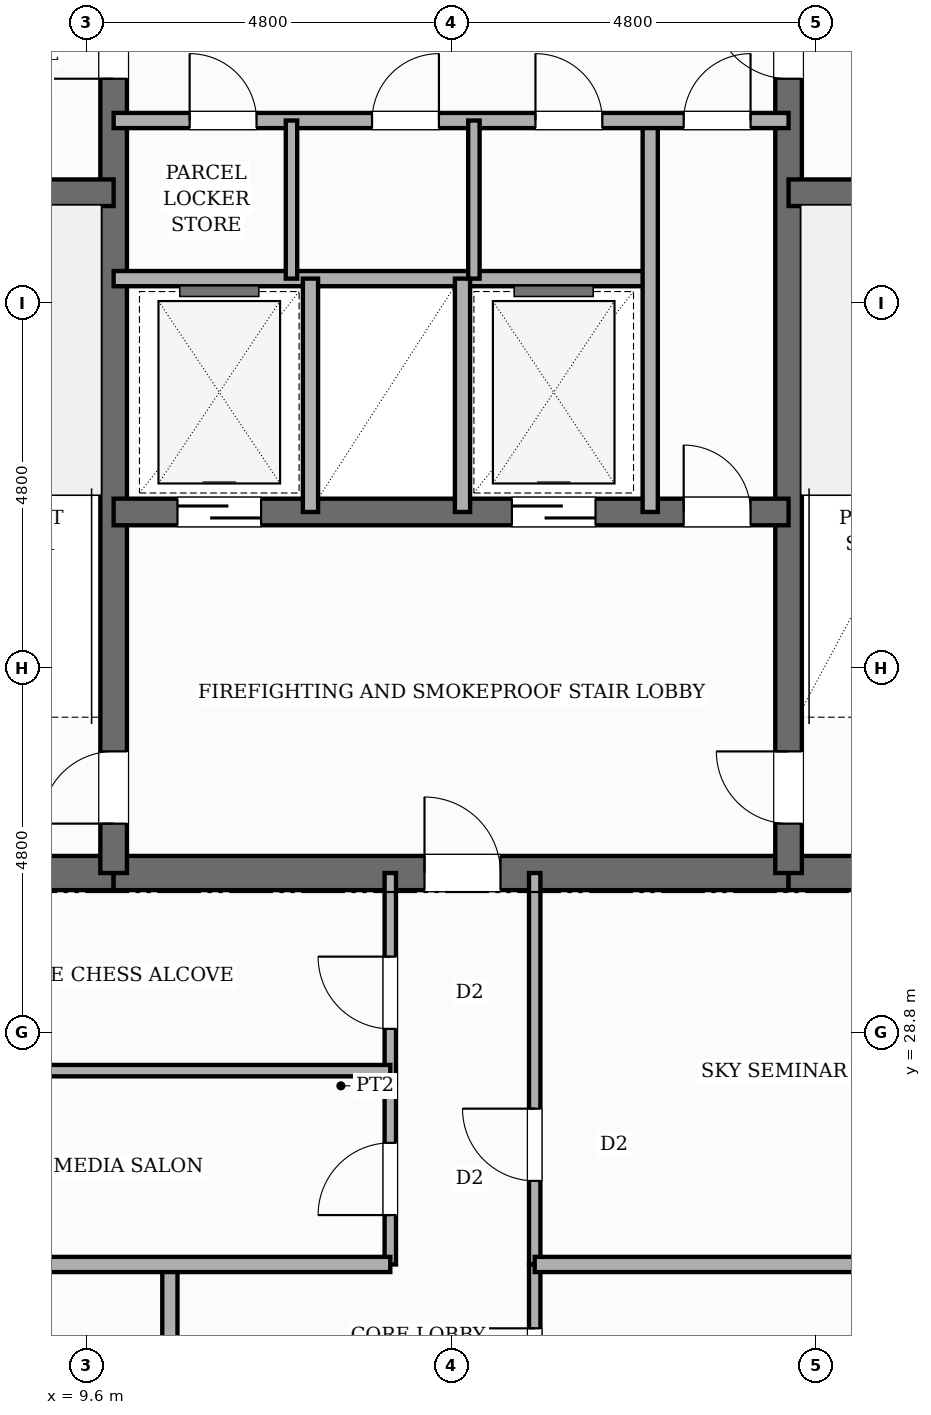
"""IFC4 building model, lengths in metres.
Left out: names, types, materials, properties, quantities, classifications, styles, units other than length and angle.
Written with IfcOpenShell. Run it as: python <this file> out.ifc"""

import sys

from ifc_helpers import new_model, si_unit, direction, frame, frame_2d, origin, place, context, subcontext, project, spatial, rectangle, extrude, element, fill, save


model = new_model("IFC4")
c1 = context("Model", 3, precision=1e-05, world=origin(), true_north=direction((0.0, 1.0)))
c2 = subcontext(c1, "Body", "Model", "MODEL_VIEW")
j1 = project(units=[si_unit("LENGTHUNIT", "METRE"), si_unit("PLANEANGLEUNIT", "RADIAN")], contexts=[c1])
p1 = place(None, origin())
s1 = spatial("IfcSite", under=j1, at=p1, CompositionType="ELEMENT")
p2 = place(p1, origin())
s2 = spatial("IfcBuilding", under=s1, at=p2, CompositionType="ELEMENT")
p3 = place(p2, frame((0.0, 0.0, 239.8)))
s3 = spatial("IfcBuildingStorey", under=s2, at=p3, CompositionType="ELEMENT", Elevation=239.8)
p4 = place(p3, frame((6.05, 30.9, 0.0), z_axis=(0.0, 0.0, 1.0), x_axis=(1.0, 0.0, 0.0)))
e1 = element("IfcWall", 1, at=p4, inside=s3, PredefinedType="SHEAR", context=c2, shape_type="SweptSolid", body=[
    extrude(rectangle(XDim=3.91, YDim=0.45, at=frame_2d((1.955, 0.0))), origin(), (0.0, 0.0, 1.0), 4.3),
])
p5 = place(p3, frame((9.96, 30.9, 0.0), z_axis=(0.0, 0.0, 1.0), x_axis=(1.0, 0.0, 0.0)))
e2 = element("IfcWall", 2, at=p5, inside=s3, PredefinedType="SHEAR", context=c2, shape_type="SweptSolid", body=[
    extrude(rectangle(XDim=8.88, YDim=0.45, at=frame_2d((4.44, 0.0))), origin(), (0.0, 0.0, 1.0), 4.3),
])
p6 = place(p5, frame((4.09, 0.0, 0.0)))
e3 = element("IfcOpeningElement", 3, at=p6, cuts=e2, PredefinedType="OPENING", context=c2, shape_type="SweptSolid", body=[
    extrude(rectangle(XDim=1.0, YDim=2.15, at=frame_2d((0.5, 1.075))), frame((0.0, 0.235, 0.0), z_axis=(0.0, -1.0, 0.0), x_axis=(1.0, 0.0, 0.0)), (0.0, 0.0, 1.0), 0.47),
])
p7 = place(p3, frame((18.84, 30.9, 0.0), z_axis=(0.0, 0.0, 1.0), x_axis=(1.0, 0.0, 0.0)))
e4 = element("IfcWall", 4, at=p7, inside=s3, PredefinedType="SHEAR", context=c2, shape_type="SweptSolid", body=[
    extrude(rectangle(XDim=3.91, YDim=0.45, at=frame_2d((1.955, 0.0))), origin(), (0.0, 0.0, 1.0), 4.3),
])
p8 = place(p3, frame((9.96, 30.9, 0.0), z_axis=(0.0, 0.0, 1.0), x_axis=(0.0, 1.0, 0.0)))
e5 = element("IfcWall", 5, at=p8, inside=s3, PredefinedType="SHEAR", context=c2, shape_type="SweptSolid", body=[
    extrude(rectangle(XDim=14.9, YDim=0.35, at=frame_2d((7.45, 0.0))), origin(), (0.0, 0.0, 1.0), 4.3),
])
p9 = place(p8, frame((0.65, 0.0, 0.0)))
e6 = element("IfcOpeningElement", 6, at=p9, cuts=e5, PredefinedType="OPENING", context=c2, shape_type="SweptSolid", body=[
    extrude(rectangle(XDim=0.95, YDim=2.1, at=frame_2d((0.475, 1.05))), frame((0.0, 0.185, 0.0), z_axis=(0.0, -1.0, 0.0), x_axis=(1.0, 0.0, 0.0)), (0.0, 0.0, 1.0), 0.37),
])
p10 = place(p8, frame((10.45, 0.0, 0.0)))
e7 = element("IfcOpeningElement", 7, at=p10, cuts=e5, PredefinedType="OPENING", context=c2, shape_type="SweptSolid", body=[
    extrude(rectangle(XDim=1.0, YDim=2.15, at=frame_2d((0.5, 1.075))), frame((0.0, 0.185, 0.0), z_axis=(0.0, -1.0, 0.0), x_axis=(1.0, 0.0, 0.0)), (0.0, 0.0, 1.0), 0.37),
])
p11 = place(p3, frame((18.84, 30.9, 0.0), z_axis=(0.0, 0.0, 1.0), x_axis=(0.0, 1.0, 0.0)))
e8 = element("IfcWall", 8, at=p11, inside=s3, PredefinedType="SHEAR", context=c2, shape_type="SweptSolid", body=[
    extrude(rectangle(XDim=14.9, YDim=0.35, at=frame_2d((7.45, 0.0))), origin(), (0.0, 0.0, 1.0), 4.3),
])
p12 = place(p11, frame((0.65, 0.0, 0.0)))
e9 = element("IfcOpeningElement", 9, at=p12, cuts=e8, PredefinedType="OPENING", context=c2, shape_type="SweptSolid", body=[
    extrude(rectangle(XDim=0.95, YDim=2.1, at=frame_2d((0.475, 1.05))), frame((0.0, 0.185, 0.0), z_axis=(0.0, -1.0, 0.0), x_axis=(1.0, 0.0, 0.0)), (0.0, 0.0, 1.0), 0.37),
])
p13 = place(p11, frame((10.45, 0.0, 0.0)))
e10 = element("IfcOpeningElement", 10, at=p13, cuts=e8, PredefinedType="OPENING", context=c2, shape_type="SweptSolid", body=[
    extrude(rectangle(XDim=1.0, YDim=2.15, at=frame_2d((0.5, 1.075))), frame((0.0, 0.185, 0.0), z_axis=(0.0, -1.0, 0.0), x_axis=(1.0, 0.0, 0.0)), (0.0, 0.0, 1.0), 0.37),
])
for number, where, z_axis, x_axis in (
    (11, (6.05, 39.85, 0.0), (0.0, 0.0, 1.0), (1.0, 0.0, 0.0)),
    (12, (18.84, 39.85, 0.0), (0.0, 0.0, 1.0), (1.0, 0.0, 0.0)),
):
    element("IfcWall", number, at=place(p3, frame(where, z_axis=z_axis, x_axis=x_axis)), inside=s3, PredefinedType="SHEAR", context=c2, shape_type="SweptSolid", body=[
        extrude(rectangle(XDim=3.91, YDim=0.35, at=frame_2d((1.955, 0.0))), origin(), (0.0, 0.0, 1.0), 4.3),
    ])
p14 = place(p3, frame((9.96, 35.65, 0.0), z_axis=(0.0, 0.0, 1.0), x_axis=(1.0, 0.0, 0.0)))
e13 = element("IfcWall", 13, at=p14, inside=s3, PredefinedType="SHEAR", context=c2, shape_type="SweptSolid", body=[
    extrude(rectangle(XDim=8.88, YDim=0.35, at=frame_2d((4.44, 0.0))), origin(), (0.0, 0.0, 1.0), 4.3),
])
p15 = place(p14, frame((0.84, 0.0, 0.0)))
e14 = element("IfcOpeningElement", 14, at=p15, cuts=e13, PredefinedType="OPENING", context=c2, shape_type="SweptSolid", body=[
    extrude(rectangle(XDim=1.1, YDim=2.15, at=frame_2d((0.55, 1.075))), frame((0.0, 0.185, 0.0), z_axis=(0.0, -1.0, 0.0), x_axis=(1.0, 0.0, 0.0)), (0.0, 0.0, 1.0), 0.37),
])
p16 = place(p14, frame((5.24, 0.0, 0.0)))
e15 = element("IfcOpeningElement", 15, at=p16, cuts=e13, PredefinedType="OPENING", context=c2, shape_type="SweptSolid", body=[
    extrude(rectangle(XDim=1.1, YDim=2.15, at=frame_2d((0.55, 1.075))), frame((0.0, 0.185, 0.0), z_axis=(0.0, -1.0, 0.0), x_axis=(1.0, 0.0, 0.0)), (0.0, 0.0, 1.0), 0.37),
])
p17 = place(p14, frame((7.5, 0.0, 0.0)))
e16 = element("IfcOpeningElement", 16, at=p17, cuts=e13, PredefinedType="OPENING", context=c2, shape_type="SweptSolid", body=[
    extrude(rectangle(XDim=0.88, YDim=2.1, at=frame_2d((0.44, 1.05))), frame((0.0, 0.185, 0.0), z_axis=(0.0, -1.0, 0.0), x_axis=(1.0, 0.0, 0.0)), (0.0, 0.0, 1.0), 0.37),
])
p18 = place(p3, frame((9.96, 38.72, 0.0), z_axis=(0.0, 0.0, 1.0), x_axis=(1.0, 0.0, 0.0)))
e17 = element("IfcWall", 17, at=p18, inside=s3, PredefinedType="POLYGONAL", context=c2, shape_type="SweptSolid", body=[
    extrude(rectangle(XDim=7.06, YDim=0.2, at=frame_2d((3.53, 0.0))), origin(), (0.0, 0.0, 1.0), 4.04),
])
for number, where, z_axis, x_axis in (
    (18, (12.55, 35.65, 0.0), (0.0, 0.0, 1.0), (0.0, 1.0, 0.0)),
    (19, (14.55, 35.65, 0.0), (0.0, 0.0, 1.0), (0.0, 1.0, 0.0)),
):
    element("IfcWall", number, at=place(p3, frame(where, z_axis=z_axis, x_axis=x_axis)), inside=s3, PredefinedType="POLYGONAL", context=c2, shape_type="SweptSolid", body=[
        extrude(rectangle(XDim=3.07, YDim=0.2, at=frame_2d((1.535, 0.0))), origin(), (0.0, 0.0, 1.0), 4.04),
    ])
p19 = place(p3, frame((17.02, 35.65, 0.0), z_axis=(0.0, 0.0, 1.0), x_axis=(0.0, 1.0, 0.0)))
e20 = element("IfcWall", 20, at=p19, inside=s3, PredefinedType="POLYGONAL", context=c2, shape_type="SweptSolid", body=[
    extrude(rectangle(XDim=5.15, YDim=0.2, at=frame_2d((2.575, 0.0))), origin(), (0.0, 0.0, 1.0), 4.04),
])
p20 = place(p3, frame((9.96, 40.8, 0.0), z_axis=(0.0, 0.0, 1.0), x_axis=(1.0, 0.0, 0.0)))
e21 = element("IfcWall", 21, at=p20, inside=s3, PredefinedType="POLYGONAL", context=c2, shape_type="SweptSolid", body=[
    extrude(rectangle(XDim=8.88, YDim=0.2, at=frame_2d((4.44, 0.0))), origin(), (0.0, 0.0, 1.0), 4.04),
])
p21 = place(p20, frame((7.5, 0.0, 0.0)))
e22 = element("IfcOpeningElement", 22, at=p21, cuts=e21, PredefinedType="OPENING", context=c2, shape_type="SweptSolid", body=[
    extrude(rectangle(XDim=0.88, YDim=2.1, at=frame_2d((0.44, 1.05))), frame((0.0, 0.11, 0.0), z_axis=(0.0, -1.0, 0.0), x_axis=(1.0, 0.0, 0.0)), (0.0, 0.0, 1.0), 0.22),
])
p22 = place(p20, frame((1.0, 0.0, 0.0)))
e23 = element("IfcOpeningElement", 23, at=p22, cuts=e21, PredefinedType="OPENING", context=c2, shape_type="SweptSolid", body=[
    extrude(rectangle(XDim=0.88, YDim=2.1, at=frame_2d((0.44, 1.05))), frame((0.0, 0.11, 0.0), z_axis=(0.0, -1.0, 0.0), x_axis=(1.0, 0.0, 0.0)), (0.0, 0.0, 1.0), 0.22),
])
p23 = place(p20, frame((3.4, 0.0, 0.0)))
e24 = element("IfcOpeningElement", 24, at=p23, cuts=e21, PredefinedType="OPENING", context=c2, shape_type="SweptSolid", body=[
    extrude(rectangle(XDim=0.88, YDim=2.1, at=frame_2d((0.44, 1.05))), frame((0.0, 0.11, 0.0), z_axis=(0.0, -1.0, 0.0), x_axis=(1.0, 0.0, 0.0)), (0.0, 0.0, 1.0), 0.22),
])
p24 = place(p20, frame((5.55, 0.0, 0.0)))
e25 = element("IfcOpeningElement", 25, at=p24, cuts=e21, PredefinedType="OPENING", context=c2, shape_type="SweptSolid", body=[
    extrude(rectangle(XDim=0.88, YDim=2.1, at=frame_2d((0.44, 1.05))), frame((0.0, 0.11, 0.0), z_axis=(0.0, -1.0, 0.0), x_axis=(1.0, 0.0, 0.0)), (0.0, 0.0, 1.0), 0.22),
])
for number, where, z_axis, x_axis in (
    (26, (12.3, 38.72, 0.0), (0.0, 0.0, 1.0), (0.0, 1.0, 0.0)),
    (27, (14.7, 38.72, 0.0), (0.0, 0.0, 1.0), (0.0, 1.0, 0.0)),
):
    element("IfcWall", number, at=place(p3, frame(where, z_axis=z_axis, x_axis=x_axis)), inside=s3, PredefinedType="PARTITIONING", context=c2, shape_type="SweptSolid", body=[
        extrude(rectangle(XDim=2.08, YDim=0.15, at=frame_2d((1.04, 0.0))), origin(), (0.0, 0.0, 1.0), 4.04),
    ])
p25 = place(p3, frame((13.6, 25.75, 0.0), z_axis=(0.0, 0.0, 1.0), x_axis=(0.0, 1.0, 0.0)))
e28 = element("IfcWall", 28, at=p25, inside=s3, PredefinedType="PARTITIONING", context=c2, shape_type="SweptSolid", body=[
    extrude(rectangle(XDim=5.15, YDim=0.15, at=frame_2d((2.575, 0.0))), origin(), (0.0, 0.0, 1.0), 4.04),
])
p26 = place(p25, frame((0.65, 0.0, 0.0)))
e29 = element("IfcOpeningElement", 29, at=p26, cuts=e28, PredefinedType="OPENING", context=c2, shape_type="SweptSolid", body=[
    extrude(rectangle(XDim=0.95, YDim=2.15, at=frame_2d((0.475, 1.075))), frame((0.0, 0.085, 0.0), z_axis=(0.0, -1.0, 0.0), x_axis=(1.0, 0.0, 0.0)), (0.0, 0.0, 1.0), 0.17),
])
p27 = place(p25, frame((3.1, 0.0, 0.0)))
e30 = element("IfcOpeningElement", 30, at=p27, cuts=e28, PredefinedType="OPENING", context=c2, shape_type="SweptSolid", body=[
    extrude(rectangle(XDim=0.95, YDim=2.15, at=frame_2d((0.475, 1.075))), frame((0.0, 0.085, 0.0), z_axis=(0.0, -1.0, 0.0), x_axis=(1.0, 0.0, 0.0)), (0.0, 0.0, 1.0), 0.17),
])
p28 = place(p3, frame((15.5, 25.75, 0.0), z_axis=(0.0, 0.0, 1.0), x_axis=(0.0, 1.0, 0.0)))
e31 = element("IfcWall", 31, at=p28, inside=s3, PredefinedType="PARTITIONING", context=c2, shape_type="SweptSolid", body=[
    extrude(rectangle(XDim=5.15, YDim=0.15, at=frame_2d((2.575, 0.0))), origin(), (0.0, 0.0, 1.0), 4.04),
])
p29 = place(p28, frame((1.1, 0.0, 0.0)))
e32 = element("IfcOpeningElement", 32, at=p29, cuts=e31, PredefinedType="OPENING", context=c2, shape_type="SweptSolid", body=[
    extrude(rectangle(XDim=0.95, YDim=2.15, at=frame_2d((0.475, 1.075))), frame((0.0, 0.085, 0.0), z_axis=(0.0, -1.0, 0.0), x_axis=(1.0, 0.0, 0.0)), (0.0, 0.0, 1.0), 0.17),
])
p30 = place(p3, frame((6.05, 28.3, 0.0), z_axis=(0.0, 0.0, 1.0), x_axis=(1.0, 0.0, 0.0)))
e33 = element("IfcWall", 33, at=p30, inside=s3, PredefinedType="PARTITIONING", context=c2, shape_type="SweptSolid", body=[
    extrude(rectangle(XDim=7.55, YDim=0.15, at=frame_2d((3.775, 0.0))), origin(), (0.0, 0.0, 1.0), 4.04),
])
p31 = place(p3, frame((10.7, 9.88, 0.0), z_axis=(0.0, 0.0, 1.0), x_axis=(0.0, 1.0, 0.0)))
e34 = element("IfcWall", 34, at=p31, inside=s3, PredefinedType="PARTITIONING", context=c2, shape_type="SweptSolid", body=[
    extrude(rectangle(XDim=15.87, YDim=0.2, at=frame_2d((7.935, 0.0))), origin(), (0.0, 0.0, 1.0), 4.04),
])
p32 = place(p31, frame((1.35, 0.0, 0.0)))
e35 = element("IfcOpeningElement", 35, at=p32, cuts=e34, PredefinedType="OPENING", context=c2, shape_type="SweptSolid", body=[
    extrude(rectangle(XDim=0.98, YDim=2.18, at=frame_2d((0.49, 1.09))), frame((0.0, 0.11, 0.0), z_axis=(0.0, -1.0, 0.0), x_axis=(1.0, 0.0, 0.0)), (0.0, 0.0, 1.0), 0.22),
])
p33 = place(p31, frame((5.23, 0.0, 0.0)))
e36 = element("IfcOpeningElement", 36, at=p33, cuts=e34, PredefinedType="OPENING", context=c2, shape_type="SweptSolid", body=[
    extrude(rectangle(XDim=0.98, YDim=2.18, at=frame_2d((0.49, 1.09))), frame((0.0, 0.11, 0.0), z_axis=(0.0, -1.0, 0.0), x_axis=(1.0, 0.0, 0.0)), (0.0, 0.0, 1.0), 0.22),
])
p34 = place(p31, frame((9.23, 0.0, 0.0)))
e37 = element("IfcOpeningElement", 37, at=p34, cuts=e34, PredefinedType="OPENING", context=c2, shape_type="SweptSolid", body=[
    extrude(rectangle(XDim=0.98, YDim=2.18, at=frame_2d((0.49, 1.09))), frame((0.0, 0.11, 0.0), z_axis=(0.0, -1.0, 0.0), x_axis=(1.0, 0.0, 0.0)), (0.0, 0.0, 1.0), 0.22),
])
p35 = place(p31, frame((13.27, 0.0, 0.0)))
e38 = element("IfcOpeningElement", 38, at=p35, cuts=e34, PredefinedType="OPENING", context=c2, shape_type="SweptSolid", body=[
    extrude(rectangle(XDim=0.98, YDim=2.18, at=frame_2d((0.49, 1.09))), frame((0.0, 0.11, 0.0), z_axis=(0.0, -1.0, 0.0), x_axis=(1.0, 0.0, 0.0)), (0.0, 0.0, 1.0), 0.22),
])
p36 = place(p3, frame((5.08, 25.75, 0.0), z_axis=(0.0, 0.0, 1.0), x_axis=(1.0, 0.0, 0.0)))
e39 = element("IfcWall", 39, at=p36, inside=s3, PredefinedType="PARTITIONING", context=c2, shape_type="SweptSolid", body=[
    extrude(rectangle(XDim=8.52, YDim=0.2, at=frame_2d((4.26, 0.0))), origin(), (0.0, 0.0, 1.0), 4.04),
])
p37 = place(p3, frame((15.5, 23.4, 0.0), z_axis=(0.0, 0.0, 1.0), x_axis=(0.0, 1.0, 0.0)))
e40 = element("IfcWall", 40, at=p37, inside=s3, PredefinedType="PARTITIONING", context=c2, shape_type="SweptSolid", body=[
    extrude(rectangle(XDim=2.35, YDim=0.15, at=frame_2d((1.175, 0.0))), origin(), (0.0, 0.0, 1.0), 4.04),
])
p38 = place(p37, frame((0.65, 0.0, 0.0)))
e41 = element("IfcOpeningElement", 41, at=p38, cuts=e40, PredefinedType="OPENING", context=c2, shape_type="SweptSolid", body=[
    extrude(rectangle(XDim=0.86, YDim=2.1, at=frame_2d((0.43, 1.05))), frame((0.0, 0.085, 0.0), z_axis=(0.0, -1.0, 0.0), x_axis=(1.0, 0.0, 0.0)), (0.0, 0.0, 1.0), 0.17),
])
p39 = place(p3, frame((15.5, 25.75, 0.0), z_axis=(0.0, 0.0, 1.0), x_axis=(1.0, 0.0, 0.0)))
e42 = element("IfcWall", 42, at=p39, inside=s3, PredefinedType="PARTITIONING", context=c2, shape_type="SweptSolid", body=[
    extrude(rectangle(XDim=8.22, YDim=0.2, at=frame_2d((4.11, 0.0))), origin(), (0.0, 0.0, 1.0), 4.04),
])
p40 = place(p9, origin())
e43 = element("IfcDoor", 43, at=p40, inside=s3, OperationType="SINGLE_SWING_LEFT", PredefinedType="DOOR", context=c2, shape_type="SweptSolid", body=[
    extrude(rectangle(XDim=0.95, YDim=2.1, at=frame_2d((0.475, 1.05))), frame((0.0, 0.025, 0.0), z_axis=(0.0, -1.0, 0.0), x_axis=(1.0, 0.0, 0.0)), (0.0, 0.0, 1.0), 0.05),
])
fill(e6, e43)
p41 = place(p12, origin())
e44 = element("IfcDoor", 44, at=p41, inside=s3, OperationType="SINGLE_SWING_RIGHT", PredefinedType="DOOR", context=c2, shape_type="SweptSolid", body=[
    extrude(rectangle(XDim=0.95, YDim=2.1, at=frame_2d((0.475, 1.05))), frame((0.0, 0.025, 0.0), z_axis=(0.0, -1.0, 0.0), x_axis=(1.0, 0.0, 0.0)), (0.0, 0.0, 1.0), 0.05),
])
fill(e9, e44)
p42 = place(p6, origin())
e45 = element("IfcDoor", 45, at=p42, inside=s3, OperationType="SINGLE_SWING_LEFT", PredefinedType="DOOR", context=c2, shape_type="SweptSolid", body=[
    extrude(rectangle(XDim=1.0, YDim=2.15, at=frame_2d((0.5, 1.075))), frame((0.0, 0.025, 0.0), z_axis=(0.0, -1.0, 0.0), x_axis=(1.0, 0.0, 0.0)), (0.0, 0.0, 1.0), 0.05),
])
fill(e3, e45)
p43 = place(p15, origin())
e46 = element("IfcDoor", 46, at=p43, inside=s3, OperationType="SLIDING_TO_LEFT", PredefinedType="DOOR", context=c2, shape_type="SweptSolid", body=[
    extrude(rectangle(XDim=1.1, YDim=2.15, at=frame_2d((0.55, 1.075))), frame((0.0, 0.025, 0.0), z_axis=(0.0, -1.0, 0.0), x_axis=(1.0, 0.0, 0.0)), (0.0, 0.0, 1.0), 0.05),
])
fill(e14, e46)
p44 = place(p16, origin())
e47 = element("IfcDoor", 47, at=p44, inside=s3, OperationType="SLIDING_TO_RIGHT", PredefinedType="DOOR", context=c2, shape_type="SweptSolid", body=[
    extrude(rectangle(XDim=1.1, YDim=2.15, at=frame_2d((0.55, 1.075))), frame((0.0, 0.025, 0.0), z_axis=(0.0, -1.0, 0.0), x_axis=(1.0, 0.0, 0.0)), (0.0, 0.0, 1.0), 0.05),
])
fill(e15, e47)
p45 = place(p17, origin())
e48 = element("IfcDoor", 48, at=p45, inside=s3, OperationType="SINGLE_SWING_LEFT", PredefinedType="DOOR", context=c2, shape_type="SweptSolid", body=[
    extrude(rectangle(XDim=0.88, YDim=2.1, at=frame_2d((0.44, 1.05))), frame((0.0, 0.025, 0.0), z_axis=(0.0, -1.0, 0.0), x_axis=(1.0, 0.0, 0.0)), (0.0, 0.0, 1.0), 0.05),
])
fill(e16, e48)
p46 = place(p21, origin())
e49 = element("IfcDoor", 49, at=p46, inside=s3, OperationType="SINGLE_SWING_RIGHT", PredefinedType="DOOR", context=c2, shape_type="SweptSolid", body=[
    extrude(rectangle(XDim=0.88, YDim=2.1, at=frame_2d((0.44, 1.05))), frame((0.0, 0.025, 0.0), z_axis=(0.0, -1.0, 0.0), x_axis=(1.0, 0.0, 0.0)), (0.0, 0.0, 1.0), 0.05),
])
fill(e22, e49)
p47 = place(p10, origin())
e50 = element("IfcDoor", 50, at=p47, inside=s3, OperationType="SINGLE_SWING_LEFT", PredefinedType="DOOR", context=c2, shape_type="SweptSolid", body=[
    extrude(rectangle(XDim=1.0, YDim=2.15, at=frame_2d((0.5, 1.075))), frame((0.0, 0.025, 0.0), z_axis=(0.0, -1.0, 0.0), x_axis=(1.0, 0.0, 0.0)), (0.0, 0.0, 1.0), 0.05),
])
fill(e7, e50)
p48 = place(p13, origin())
e51 = element("IfcDoor", 51, at=p48, inside=s3, OperationType="SINGLE_SWING_RIGHT", PredefinedType="DOOR", context=c2, shape_type="SweptSolid", body=[
    extrude(rectangle(XDim=1.0, YDim=2.15, at=frame_2d((0.5, 1.075))), frame((0.0, 0.025, 0.0), z_axis=(0.0, -1.0, 0.0), x_axis=(1.0, 0.0, 0.0)), (0.0, 0.0, 1.0), 0.05),
])
fill(e10, e51)
p49 = place(p22, origin())
e52 = element("IfcDoor", 52, at=p49, inside=s3, OperationType="SINGLE_SWING_LEFT", PredefinedType="DOOR", context=c2, shape_type="SweptSolid", body=[
    extrude(rectangle(XDim=0.88, YDim=2.1, at=frame_2d((0.44, 1.05))), frame((0.0, 0.025, 0.0), z_axis=(0.0, -1.0, 0.0), x_axis=(1.0, 0.0, 0.0)), (0.0, 0.0, 1.0), 0.05),
])
fill(e23, e52)
p50 = place(p23, origin())
e53 = element("IfcDoor", 53, at=p50, inside=s3, OperationType="SINGLE_SWING_RIGHT", PredefinedType="DOOR", context=c2, shape_type="SweptSolid", body=[
    extrude(rectangle(XDim=0.88, YDim=2.1, at=frame_2d((0.44, 1.05))), frame((0.0, 0.025, 0.0), z_axis=(0.0, -1.0, 0.0), x_axis=(1.0, 0.0, 0.0)), (0.0, 0.0, 1.0), 0.05),
])
fill(e24, e53)
p51 = place(p24, origin())
e54 = element("IfcDoor", 54, at=p51, inside=s3, OperationType="SINGLE_SWING_LEFT", PredefinedType="DOOR", context=c2, shape_type="SweptSolid", body=[
    extrude(rectangle(XDim=0.88, YDim=2.1, at=frame_2d((0.44, 1.05))), frame((0.0, 0.025, 0.0), z_axis=(0.0, -1.0, 0.0), x_axis=(1.0, 0.0, 0.0)), (0.0, 0.0, 1.0), 0.05),
])
fill(e25, e54)
p52 = place(p26, origin())
e55 = element("IfcDoor", 55, at=p52, inside=s3, OperationType="SINGLE_SWING_LEFT", PredefinedType="DOOR", context=c2, shape_type="SweptSolid", body=[
    extrude(rectangle(XDim=0.95, YDim=2.15, at=frame_2d((0.475, 1.075))), frame((0.0, 0.025, 0.0), z_axis=(0.0, -1.0, 0.0), x_axis=(1.0, 0.0, 0.0)), (0.0, 0.0, 1.0), 0.05),
])
fill(e29, e55)
p53 = place(p27, origin())
e56 = element("IfcDoor", 56, at=p53, inside=s3, OperationType="SINGLE_SWING_RIGHT", PredefinedType="DOOR", context=c2, shape_type="SweptSolid", body=[
    extrude(rectangle(XDim=0.95, YDim=2.15, at=frame_2d((0.475, 1.075))), frame((0.0, 0.025, 0.0), z_axis=(0.0, -1.0, 0.0), x_axis=(1.0, 0.0, 0.0)), (0.0, 0.0, 1.0), 0.05),
])
fill(e30, e56)
p54 = place(p29, origin())
e57 = element("IfcDoor", 57, at=p54, inside=s3, OperationType="SINGLE_SWING_RIGHT", PredefinedType="DOOR", context=c2, shape_type="SweptSolid", body=[
    extrude(rectangle(XDim=0.95, YDim=2.15, at=frame_2d((0.475, 1.075))), frame((0.0, 0.025, 0.0), z_axis=(0.0, -1.0, 0.0), x_axis=(1.0, 0.0, 0.0)), (0.0, 0.0, 1.0), 0.05),
])
fill(e32, e57)
p55 = place(p38, origin())
e58 = element("IfcDoor", 58, at=p55, inside=s3, OperationType="SINGLE_SWING_RIGHT", PredefinedType="DOOR", context=c2, shape_type="SweptSolid", body=[
    extrude(rectangle(XDim=0.86, YDim=2.1, at=frame_2d((0.43, 1.05))), frame((0.0, 0.025, 0.0), z_axis=(0.0, -1.0, 0.0), x_axis=(1.0, 0.0, 0.0)), (0.0, 0.0, 1.0), 0.05),
])
fill(e41, e58)
save(model, sys.argv[1])
